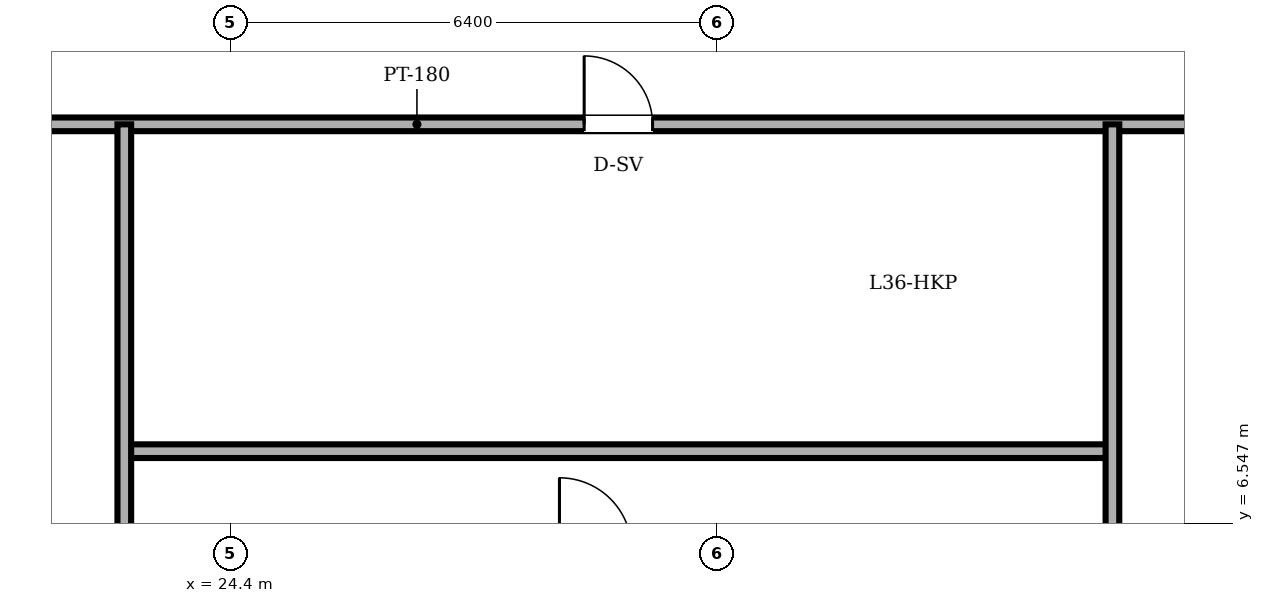
"""IFC4 building model, lengths in metres.
Left out: names, types, materials, properties, quantities, classifications, styles, units other than length and angle.
Written with IfcOpenShell. Run it as: python <this file> out.ifc"""

import sys

from ifc_helpers import new_model, si_unit, direction, frame, frame_2d, origin, place, context, subcontext, project, spatial, rectangle, extrude, element, fill, save


model = new_model("IFC4")
c1 = context("Model", 3, precision=1e-05, world=origin(), true_north=direction((0.0, 1.0)))
c2 = subcontext(c1, "Body", "Model", "MODEL_VIEW")
j1 = project(units=[si_unit("LENGTHUNIT", "METRE"), si_unit("PLANEANGLEUNIT", "RADIAN")], contexts=[c1])
p1 = place(None, origin())
s1 = spatial("IfcSite", under=j1, at=p1, CompositionType="ELEMENT")
p2 = place(p1, origin())
s2 = spatial("IfcBuilding", under=s1, at=p2, CompositionType="ELEMENT")
p3 = place(p2, frame((0.0, 0.0, 138.7)))
s3 = spatial("IfcBuildingStorey", under=s2, at=p3, CompositionType="ELEMENT", Elevation=138.7)
p4 = place(p3, frame((23.0, 7.5, 0.0), z_axis=(0.0, 0.0, 1.0), x_axis=(1.0, 0.0, 0.0)))
e1 = element("IfcWall", 1, at=p4, inside=s3, PredefinedType="PARTITIONING", context=c2, shape_type="SweptSolid", body=[
    extrude(rectangle(XDim=13.0, YDim=0.18, at=frame_2d((6.5, 0.0))), origin(), (0.0, 0.0, 1.0), 4.9),
])
p5 = place(p3, frame((13.8, 11.8, 0.0), z_axis=(0.0, 0.0, 1.0), x_axis=(1.0, 0.0, 0.0)))
e2 = element("IfcWall", 2, at=p5, inside=s3, PredefinedType="PARTITIONING", context=c2, shape_type="SweptSolid", body=[
    extrude(rectangle(XDim=26.1, YDim=0.18, at=frame_2d((13.05, 0.0))), origin(), (0.0, 0.0, 1.0), 4.9),
])
p6 = place(p5, frame((15.25, 0.0, 0.0)))
e3 = element("IfcOpeningElement", 3, at=p6, cuts=e2, PredefinedType="OPENING", context=c2, shape_type="SweptSolid", body=[
    extrude(rectangle(XDim=0.9, YDim=2.05, at=frame_2d((0.45, 1.025))), frame((0.0, 0.1, 0.0), z_axis=(0.0, -1.0, 0.0), x_axis=(1.0, 0.0, 0.0)), (0.0, 0.0, 1.0), 0.2),
])
for number, where, z_axis, x_axis in (
    (4, (23.0, 6.2, 0.0), (0.0, 0.0, 1.0), (0.0, 1.0, 0.0)),
    (5, (36.0, 6.2, 0.0), (0.0, 0.0, 1.0), (0.0, 1.0, 0.0)),
):
    element("IfcWall", number, at=place(p3, frame(where, z_axis=z_axis, x_axis=x_axis)), inside=s3, PredefinedType="PARTITIONING", context=c2, shape_type="SweptSolid", body=[
        extrude(rectangle(XDim=5.6, YDim=0.18, at=frame_2d((2.8, 0.0))), origin(), (0.0, 0.0, 1.0), 4.9),
    ])
p7 = place(p6, origin())
e6 = element("IfcDoor", 6, at=p7, inside=s3, OperationType="SINGLE_SWING_LEFT", PredefinedType="DOOR", context=c2, shape_type="SweptSolid", body=[
    extrude(rectangle(XDim=0.9, YDim=2.05, at=frame_2d((0.45, 1.025))), frame((0.0, 0.025, 0.0), z_axis=(0.0, -1.0, 0.0), x_axis=(1.0, 0.0, 0.0)), (0.0, 0.0, 1.0), 0.05),
])
fill(e3, e6)
save(model, sys.argv[1])
